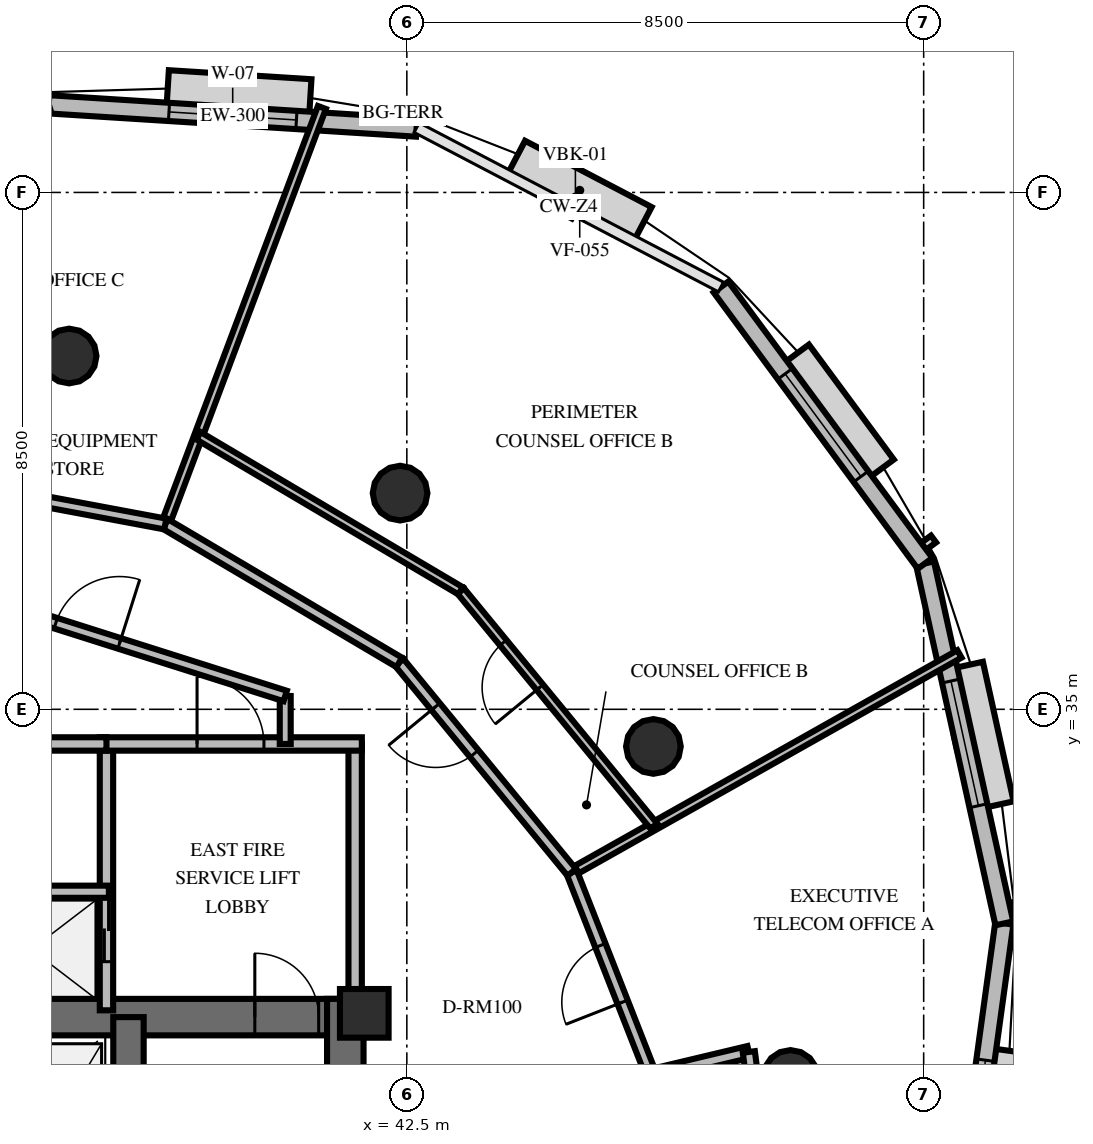
"""IFC4 building model, lengths in metres.
Left out: names, types, materials, properties, quantities, classifications, styles, units other than length and angle.
Written with IfcOpenShell. Run it as: python <this file> out.ifc"""

import sys

from ifc_helpers import new_model, si_unit, direction, frame, frame_2d, origin, origin_2d, place, context, subcontext, project, spatial, rectangle, circle, extrude, element, fill, save


model = new_model("IFC4")
c1 = context("Model", 3, precision=1e-05, world=origin(), true_north=direction((0.0, 1.0)))
c2 = subcontext(c1, "Body", "Model", "MODEL_VIEW")
j1 = project(units=[si_unit("LENGTHUNIT", "METRE"), si_unit("PLANEANGLEUNIT", "RADIAN")], contexts=[c1])
p1 = place(None, origin())
s1 = spatial("IfcSite", under=j1, at=p1, CompositionType="ELEMENT")
p2 = place(p1, origin())
s2 = spatial("IfcBuilding", under=s1, at=p2, CompositionType="ELEMENT")
p3 = place(p2, frame((0.0, 0.0, 237.6)))
s3 = spatial("IfcBuildingStorey", under=s2, at=p3, CompositionType="ELEMENT", Elevation=237.6)
p4 = place(p3, frame((26.222, 29.938, 0.0), z_axis=(0.0, 0.0, 1.0), x_axis=(1.0, 0.0, 0.0)))
e1 = element("IfcWall", 1, at=p4, inside=s3, PredefinedType="SHEAR", context=c2, shape_type="SweptSolid", body=[
    extrude(rectangle(XDim=15.566, YDim=0.6, at=frame_2d((7.783, 0.0))), origin(), (0.0, 0.0, 1.0), 3.6),
])
p5 = place(p4, frame((0.728, 0.0, 0.0)))
e2 = element("IfcOpeningElement", 2, at=p5, cuts=e1, PredefinedType="OPENING", context=c2, shape_type="SweptSolid", body=[
    extrude(rectangle(XDim=1.05, YDim=2.15, at=frame_2d((0.525, 1.075))), frame((0.0, 0.31, 0.0), z_axis=(0.0, -1.0, 0.0), x_axis=(1.0, 0.0, 0.0)), (0.0, 0.0, 1.0), 0.62),
])
p6 = place(p4, frame((13.778, 0.0, 0.0)))
e3 = element("IfcOpeningElement", 3, at=p6, cuts=e1, PredefinedType="OPENING", context=c2, shape_type="SweptSolid", body=[
    extrude(rectangle(XDim=1.05, YDim=2.15, at=frame_2d((0.525, 1.075))), frame((0.0, 0.31, 0.0), z_axis=(0.0, -1.0, 0.0), x_axis=(1.0, 0.0, 0.0)), (0.0, 0.0, 1.0), 0.62),
])
p7 = place(p4, frame((7.228, 0.0, 0.0)))
e4 = element("IfcOpeningElement", 4, at=p7, cuts=e1, PredefinedType="OPENING", context=c2, shape_type="SweptSolid", body=[
    extrude(rectangle(XDim=1.1, YDim=2.15, at=frame_2d((0.55, 1.075))), frame((0.0, 0.31, 0.0), z_axis=(0.0, -1.0, 0.0), x_axis=(1.0, 0.0, 0.0)), (0.0, 0.0, 1.0), 0.62),
])
p8 = place(p3, frame((41.488, 19.962, 0.0), z_axis=(0.0, 0.0, 1.0), x_axis=(0.0, 1.0, 0.0)))
e5 = element("IfcWall", 5, at=p8, inside=s3, PredefinedType="SHEAR", context=c2, shape_type="SweptSolid", body=[
    extrude(rectangle(XDim=10.276, YDim=0.6, at=frame_2d((5.138, 0.0))), origin(), (0.0, 0.0, 1.0), 3.6),
])
p9 = place(p3, frame((37.922, 20.262, 0.0), z_axis=(0.0, 0.0, 1.0), x_axis=(0.0, 1.0, 0.0)))
e6 = element("IfcWall", 6, at=p9, inside=s3, PredefinedType="SHEAR", context=c2, shape_type="SweptSolid", body=[
    extrude(rectangle(XDim=9.676, YDim=0.5, at=frame_2d((4.838, 0.0))), origin(), (0.0, 0.0, 1.0), 3.6),
])
p10 = place(p3, frame((41.8, 30.0, 0.0), z_axis=(0.0, 0.0, 1.0), x_axis=(1.0, 0.0, 0.0)))
e7 = element("IfcColumn", 7, at=p10, inside=s3, PredefinedType="PILASTER", context=c2, shape_type="SweptSolid", body=[
    extrude(rectangle(XDim=0.8, YDim=0.8, at=origin_2d()), origin(), (0.0, 0.0, 1.0), 3.6),
])
for number, where, z_axis, x_axis in (
    (8, (48.81, 28.946, 0.0), (0.0, 0.0, 1.0), (1.0, 0.0, 0.0)),
    (9, (46.555, 34.389, 0.0), (0.0, 0.0, 1.0), (1.0, 0.0, 0.0)),
    (10, (42.389, 38.555, 0.0), (0.0, 0.0, 1.0), (1.0, 0.0, 0.0)),
    (11, (36.946, 40.81, 0.0), (0.0, 0.0, 1.0), (1.0, 0.0, 0.0)),
):
    element("IfcColumn", number, at=place(p3, frame(where, z_axis=z_axis, x_axis=x_axis)), inside=s3, PredefinedType="COLUMN", context=c2, shape_type="SweptSolid", body=[
        extrude(circle(Radius=0.45, at=origin_2d()), origin(), (0.0, 0.0, 1.0), 3.6),
    ])
p11 = place(p3, frame((42.661, 44.567, 0.0), z_axis=(0.0, 0.0, 1.0), x_axis=(-0.998006550378, 0.063110422294, 0.0)))
e12 = element("IfcWall", 12, at=p11, inside=s3, PredefinedType="SOLIDWALL", context=c2, shape_type="SweptSolid", body=[
    extrude(rectangle(XDim=6.062, YDim=0.3, at=frame_2d((3.031, 0.0))), origin(), (0.0, 0.0, 1.0), 2.76),
])
p12 = place(p11, frame((1.981, 0.0, 0.8)))
e13 = element("IfcOpeningElement", 13, at=p12, cuts=e12, PredefinedType="OPENING", context=c2, shape_type="SweptSolid", body=[
    extrude(rectangle(XDim=2.1, YDim=1.85, at=frame_2d((1.05, 0.925))), frame((0.0, 0.16, 0.0), z_axis=(0.0, -1.0, 0.0), x_axis=(1.0, 0.0, 0.0)), (0.0, 0.0, 1.0), 0.32),
])
p13 = place(p3, frame((51.42, 24.899, 0.0), z_axis=(0.0, 0.0, 1.0), x_axis=(0.136531687657, 0.990635704114, 0.0)))
e14 = element("IfcWall", 14, at=p13, inside=s3, PredefinedType="SOLIDWALL", context=c2, shape_type="SweptSolid", body=[
    extrude(rectangle(XDim=6.643, YDim=0.3, at=frame_2d((3.322, 0.0))), origin(), (0.0, 0.0, 1.0), 2.76),
])
p14 = place(p13, frame((2.272, 0.0, 0.8)))
e15 = element("IfcOpeningElement", 15, at=p14, cuts=e14, PredefinedType="OPENING", context=c2, shape_type="SweptSolid", body=[
    extrude(rectangle(XDim=2.1, YDim=1.85, at=frame_2d((1.05, 0.925))), frame((0.0, 0.16, 0.0), z_axis=(0.0, -1.0, 0.0), x_axis=(1.0, 0.0, 0.0)), (0.0, 0.0, 1.0), 0.32),
])
p15 = place(p3, frame((52.327, 31.479, 0.0), z_axis=(0.0, 0.0, 1.0), x_axis=(-0.215062302222, 0.976600330823, 0.0)))
e16 = element("IfcWall", 16, at=p15, inside=s3, PredefinedType="SOLIDWALL", context=c2, shape_type="SweptSolid", body=[
    extrude(rectangle(XDim=6.062, YDim=0.3, at=frame_2d((3.031, 0.0))), origin(), (0.0, 0.0, 1.0), 2.76),
])
p16 = place(p15, frame((1.981, 0.0, 0.8)))
e17 = element("IfcOpeningElement", 17, at=p16, cuts=e16, PredefinedType="OPENING", context=c2, shape_type="SweptSolid", body=[
    extrude(rectangle(XDim=2.1, YDim=1.85, at=frame_2d((1.05, 0.925))), frame((0.0, 0.16, 0.0), z_axis=(0.0, -1.0, 0.0), x_axis=(1.0, 0.0, 0.0)), (0.0, 0.0, 1.0), 0.32),
])
p17 = place(p3, frame((51.023, 37.4, 0.0), z_axis=(0.0, 0.0, 1.0), x_axis=(-0.594093357813, 0.804396097829, 0.0)))
e18 = element("IfcWall", 18, at=p17, inside=s3, PredefinedType="SOLIDWALL", context=c2, shape_type="SweptSolid", body=[
    extrude(rectangle(XDim=5.65, YDim=0.3, at=frame_2d((2.825, 0.0))), origin(), (0.0, 0.0, 1.0), 2.76),
])
p18 = place(p17, frame((1.775, 0.0, 0.8)))
e19 = element("IfcOpeningElement", 19, at=p18, cuts=e18, PredefinedType="OPENING", context=c2, shape_type="SweptSolid", body=[
    extrude(rectangle(XDim=2.1, YDim=1.85, at=frame_2d((1.05, 0.925))), frame((0.0, 0.16, 0.0), z_axis=(0.0, -1.0, 0.0), x_axis=(1.0, 0.0, 0.0)), (0.0, 0.0, 1.0), 0.32),
])
p19 = place(p3, frame((37.56, 30.05, 0.0), z_axis=(0.0, 0.0, 1.0), x_axis=(0.0, 1.0, 0.0)))
e20 = element("IfcWall", 20, at=p19, inside=s3, PredefinedType="SOLIDWALL", context=c2, shape_type="SweptSolid", body=[
    extrude(rectangle(XDim=4.38, YDim=0.22, at=frame_2d((2.19, 0.0))), origin(), (0.0, 0.0, 1.0), 2.46),
])
p20 = place(p19, frame((0.8, 0.0, 0.0)))
e21 = element("IfcOpeningElement", 21, at=p20, cuts=e20, PredefinedType="OPENING", context=c2, shape_type="SweptSolid", body=[
    extrude(rectangle(XDim=1.05, YDim=2.1, at=frame_2d((0.525, 1.05))), frame((0.0, 0.12, 0.0), z_axis=(0.0, -1.0, 0.0), x_axis=(1.0, 0.0, 0.0)), (0.0, 0.0, 1.0), 0.24),
])
p21 = place(p3, frame((41.65, 30.05, 0.0), z_axis=(0.0, 0.0, 1.0), x_axis=(0.0, 1.0, 0.0)))
e22 = element("IfcWall", 22, at=p21, inside=s3, PredefinedType="SOLIDWALL", context=c2, shape_type="SweptSolid", body=[
    extrude(rectangle(XDim=4.38, YDim=0.22, at=frame_2d((2.19, 0.0))), origin(), (0.0, 0.0, 1.0), 2.46),
])
p22 = place(p3, frame((37.45, 34.43, 0.0), z_axis=(0.0, 0.0, 1.0), x_axis=(1.0, 0.0, 0.0)))
e23 = element("IfcWall", 23, at=p22, inside=s3, PredefinedType="SOLIDWALL", context=c2, shape_type="SweptSolid", body=[
    extrude(rectangle(XDim=4.31, YDim=0.22, at=frame_2d((2.155, 0.0))), origin(), (0.0, 0.0, 1.0), 2.46),
])
p23 = place(p22, frame((1.6, 0.0, 0.0)))
e24 = element("IfcOpeningElement", 24, at=p23, cuts=e23, PredefinedType="OPENING", context=c2, shape_type="SweptSolid", body=[
    extrude(rectangle(XDim=1.1, YDim=2.15, at=frame_2d((0.55, 1.075))), frame((0.0, 0.12, 0.0), z_axis=(0.0, -1.0, 0.0), x_axis=(1.0, 0.0, 0.0)), (0.0, 0.0, 1.0), 0.24),
])
p24 = place(p3, frame((35.05, 32.0, 0.0), z_axis=(0.0, 0.0, 1.0), x_axis=(1.0, 0.0, 0.0)))
e25 = element("IfcWall", 25, at=p24, inside=s3, PredefinedType="SOLIDWALL", context=c2, shape_type="SweptSolid", body=[
    extrude(rectangle(XDim=2.55, YDim=0.2, at=frame_2d((1.275, 0.0))), origin(), (0.0, 0.0, 1.0), 2.46),
])
p25 = place(p3, frame((30.44, 34.43, 0.0), z_axis=(0.0, 0.0, 1.0), x_axis=(1.0, 0.0, 0.0)))
e26 = element("IfcWall", 26, at=p25, inside=s3, PredefinedType="SOLIDWALL", context=c2, shape_type="SweptSolid", body=[
    extrude(rectangle(XDim=7.12, YDim=0.22, at=frame_2d((3.56, 0.0))), origin(), (0.0, 0.0, 1.0), 2.46),
])
p26 = place(p25, frame((3.01, 0.0, 0.0)))
e27 = element("IfcOpeningElement", 27, at=p26, cuts=e26, PredefinedType="OPENING", context=c2, shape_type="SweptSolid", body=[
    extrude(rectangle(XDim=1.1, YDim=2.15, at=frame_2d((0.55, 1.075))), frame((0.0, 0.12, 0.0), z_axis=(0.0, -1.0, 0.0), x_axis=(1.0, 0.0, 0.0)), (0.0, 0.0, 1.0), 0.24),
])
p27 = place(p3, frame((40.5, 35.219, 0.0), z_axis=(0.0, 0.0, 1.0), x_axis=(0.0, -1.0, 0.0)))
e28 = element("IfcWall", 28, at=p27, inside=s3, PredefinedType="PARTITIONING", context=c2, shape_type="SweptSolid", body=[
    extrude(rectangle(XDim=0.789, YDim=0.18, at=frame_2d((0.395, 0.0))), origin(), (0.0, 0.0, 1.0), 2.46),
])
p28 = place(p3, frame((34.0, 37.28, 0.0), z_axis=(0.0, 0.0, 1.0), x_axis=(0.953228121756, -0.302251795518, 0.0)))
e29 = element("IfcWall", 29, at=p28, inside=s3, PredefinedType="PARTITIONING", context=c2, shape_type="SweptSolid", body=[
    extrude(rectangle(XDim=6.819, YDim=0.18, at=frame_2d((3.409, 0.0))), origin(), (0.0, 0.0, 1.0), 2.46),
])
p29 = place(p28, frame((2.86, 0.0, 0.0)))
e30 = element("IfcOpeningElement", 30, at=p29, cuts=e29, PredefinedType="OPENING", context=c2, shape_type="SweptSolid", body=[
    extrude(rectangle(XDim=1.1, YDim=2.15, at=frame_2d((0.55, 1.075))), frame((0.0, 0.1, 0.0), z_axis=(0.0, -1.0, 0.0), x_axis=(1.0, 0.0, 0.0)), (0.0, 0.0, 1.0), 0.2),
])
p30 = place(p3, frame((46.52, 28.983, 0.0), z_axis=(0.0, 0.0, 1.0), x_axis=(0.972788749697, 0.231693867989, 0.0)))
e31 = element("IfcWall", 31, at=p30, inside=s3, PredefinedType="PLUMBINGWALL", context=c2, shape_type="SweptSolid", body=[
    extrude(rectangle(XDim=1.65, YDim=0.2, at=frame_2d((0.825, 0.0))), origin(), (0.0, 0.0, 1.0), 2.46),
])
p31 = place(p3, frame((48.516, 26.355, 0.0), z_axis=(0.0, 0.0, 1.0), x_axis=(-0.128764955516, 0.991675141481, 0.0)))
e32 = element("IfcWall", 32, at=p31, inside=s3, PredefinedType="PLUMBINGWALL", context=c2, shape_type="SweptSolid", body=[
    extrude(rectangle(XDim=3.036, YDim=0.2, at=frame_2d((1.518, 0.0))), origin(), (0.0, 0.0, 1.0), 2.46),
])
p32 = place(p3, frame((45.212, 32.318, 0.0), z_axis=(0.0, 0.0, 1.0), x_axis=(0.871214471027, 0.490902582468, 0.0)))
e33 = element("IfcWall", 33, at=p32, inside=s3, PredefinedType="PARTITIONING", context=c2, shape_type="SweptSolid", body=[
    extrude(rectangle(XDim=7.318, YDim=0.14, at=frame_2d((3.659, 0.0))), origin(), (0.0, 0.0, 1.0), 2.46),
])
p33 = place(p3, frame((46.52, 28.983, 0.0), z_axis=(0.0, 0.0, 1.0), x_axis=(-0.364895255198, 0.931048577, 0.0)))
e34 = element("IfcWall", 34, at=p33, inside=s3, PredefinedType="PARTITIONING", context=c2, shape_type="SweptSolid", body=[
    extrude(rectangle(XDim=3.582, YDim=0.18, at=frame_2d((1.791, 0.0))), origin(), (0.0, 0.0, 1.0), 2.46),
])
p34 = place(p33, frame((1.291, 0.0, 0.0)))
e35 = element("IfcOpeningElement", 35, at=p34, cuts=e34, PredefinedType="OPENING", context=c2, shape_type="SweptSolid", body=[
    extrude(rectangle(XDim=1.0, YDim=2.15, at=frame_2d((0.5, 1.075))), frame((0.0, 0.1, 0.0), z_axis=(0.0, -1.0, 0.0), x_axis=(1.0, 0.0, 0.0)), (0.0, 0.0, 1.0), 0.2),
])
p35 = place(p3, frame((38.528, 38.047, 0.0), z_axis=(0.0, 0.0, 1.0), x_axis=(0.351821633052, 0.936067058771, 0.0)))
e36 = element("IfcWall", 36, at=p35, inside=s3, PredefinedType="PARTITIONING", context=c2, shape_type="SweptSolid", body=[
    extrude(rectangle(XDim=7.318, YDim=0.14, at=frame_2d((3.659, 0.0))), origin(), (0.0, 0.0, 1.0), 2.46),
])
p36 = place(p3, frame((45.212, 32.318, 0.0), z_axis=(0.0, 0.0, 1.0), x_axis=(-0.634714961422, 0.772746347611, 0.0)))
e37 = element("IfcWall", 37, at=p36, inside=s3, PredefinedType="PARTITIONING", context=c2, shape_type="SweptSolid", body=[
    extrude(rectangle(XDim=4.469, YDim=0.18, at=frame_2d((2.235, 0.0))), origin(), (0.0, 0.0, 1.0), 2.46),
])
p37 = place(p36, frame((2.527, 0.0, 0.0)))
e38 = element("IfcOpeningElement", 38, at=p37, cuts=e37, PredefinedType="OPENING", context=c2, shape_type="SweptSolid", body=[
    extrude(rectangle(XDim=1.0, YDim=2.15, at=frame_2d((0.5, 1.075))), frame((0.0, 0.1, 0.0), z_axis=(0.0, -1.0, 0.0), x_axis=(1.0, 0.0, 0.0)), (0.0, 0.0, 1.0), 0.2),
])
p38 = place(p3, frame((42.375, 35.772, 0.0), z_axis=(0.0, 0.0, 1.0), x_axis=(-0.860724202021, 0.509071554946, 0.0)))
e39 = element("IfcWall", 39, at=p38, inside=s3, PredefinedType="PARTITIONING", context=c2, shape_type="SweptSolid", body=[
    extrude(rectangle(XDim=4.47, YDim=0.18, at=frame_2d((2.235, 0.0))), origin(), (0.0, 0.0, 1.0), 2.46),
])
p39 = place(p3, frame((46.563, 33.079, 0.0), z_axis=(0.0, 0.0, 1.0), x_axis=(-0.634725908392, 0.772737355908, 0.0)))
e40 = element("IfcWall", 40, at=p39, inside=s3, PredefinedType="PARTITIONING", context=c2, shape_type="SweptSolid", body=[
    extrude(rectangle(XDim=5.008, YDim=0.14, at=frame_2d((2.504, 0.0))), origin(), (0.0, 0.0, 1.0), 2.46),
])
p40 = place(p39, frame((2.954, 0.0, 0.0)))
e41 = element("IfcOpeningElement", 41, at=p40, cuts=e40, PredefinedType="OPENING", context=c2, shape_type="SweptSolid", body=[
    extrude(rectangle(XDim=0.95, YDim=2.15, at=frame_2d((0.475, 1.075))), frame((0.0, 0.08, 0.0), z_axis=(0.0, -1.0, 0.0), x_axis=(1.0, 0.0, 0.0)), (0.0, 0.0, 1.0), 0.16),
])
p41 = place(p3, frame((43.384, 36.949, 0.0), z_axis=(0.0, 0.0, 1.0), x_axis=(-0.860748876633, 0.509029833483, 0.0)))
e42 = element("IfcWall", 42, at=p41, inside=s3, PredefinedType="PARTITIONING", context=c2, shape_type="SweptSolid", body=[
    extrude(rectangle(XDim=5.008, YDim=0.14, at=frame_2d((2.504, 0.0))), origin(), (0.0, 0.0, 1.0), 2.46),
])
p42 = place(p3, frame((38.528, 38.047, 0.0), z_axis=(0.0, 0.0, 1.0), x_axis=(-0.982933965097, 0.183958746079, 0.0)))
e43 = element("IfcWall", 43, at=p42, inside=s3, PredefinedType="PARTITIONING", context=c2, shape_type="SweptSolid", body=[
    extrude(rectangle(XDim=4.47, YDim=0.18, at=frame_2d((2.235, 0.0))), origin(), (0.0, 0.0, 1.0), 2.46),
])
p43 = place(p12, origin())
e44 = element("IfcWindow", 44, at=p43, inside=s3, PartitioningType="SINGLE_PANEL", PredefinedType="WINDOW", context=c2, shape_type="SweptSolid", body=[
    extrude(rectangle(XDim=2.1, YDim=1.85, at=frame_2d((1.05, 0.925))), frame((0.0, 0.03, 0.0), z_axis=(0.0, -1.0, 0.0), x_axis=(1.0, 0.0, 0.0)), (0.0, 0.0, 1.0), 0.06),
])
fill(e13, e44)
p44 = place(p14, origin())
e45 = element("IfcWindow", 45, at=p44, inside=s3, PartitioningType="SINGLE_PANEL", PredefinedType="WINDOW", context=c2, shape_type="SweptSolid", body=[
    extrude(rectangle(XDim=2.1, YDim=1.85, at=frame_2d((1.05, 0.925))), frame((0.0, 0.03, 0.0), z_axis=(0.0, -1.0, 0.0), x_axis=(1.0, 0.0, 0.0)), (0.0, 0.0, 1.0), 0.06),
])
fill(e15, e45)
p45 = place(p16, origin())
e46 = element("IfcWindow", 46, at=p45, inside=s3, PartitioningType="SINGLE_PANEL", PredefinedType="WINDOW", context=c2, shape_type="SweptSolid", body=[
    extrude(rectangle(XDim=2.1, YDim=1.85, at=frame_2d((1.05, 0.925))), frame((0.0, 0.03, 0.0), z_axis=(0.0, -1.0, 0.0), x_axis=(1.0, 0.0, 0.0)), (0.0, 0.0, 1.0), 0.06),
])
fill(e17, e46)
p46 = place(p18, origin())
e47 = element("IfcWindow", 47, at=p46, inside=s3, PartitioningType="SINGLE_PANEL", PredefinedType="WINDOW", context=c2, shape_type="SweptSolid", body=[
    extrude(rectangle(XDim=2.1, YDim=1.85, at=frame_2d((1.05, 0.925))), frame((0.0, 0.03, 0.0), z_axis=(0.0, -1.0, 0.0), x_axis=(1.0, 0.0, 0.0)), (0.0, 0.0, 1.0), 0.06),
])
fill(e19, e47)
p47 = place(p6, origin())
e48 = element("IfcDoor", 48, at=p47, inside=s3, OperationType="SINGLE_SWING_LEFT", PredefinedType="DOOR", context=c2, shape_type="SweptSolid", body=[
    extrude(rectangle(XDim=1.05, YDim=2.15, at=frame_2d((0.525, 1.075))), frame((0.0, 0.025, 0.0), z_axis=(0.0, -1.0, 0.0), x_axis=(1.0, 0.0, 0.0)), (0.0, 0.0, 1.0), 0.05),
])
fill(e3, e48)
p48 = place(p23, origin())
e49 = element("IfcDoor", 49, at=p48, inside=s3, OperationType="SINGLE_SWING_LEFT", PredefinedType="DOOR", context=c2, shape_type="SweptSolid", body=[
    extrude(rectangle(XDim=1.1, YDim=2.15, at=frame_2d((0.55, 1.075))), frame((0.0, 0.025, 0.0), z_axis=(0.0, -1.0, 0.0), x_axis=(1.0, 0.0, 0.0)), (0.0, 0.0, 1.0), 0.05),
])
fill(e24, e49)
p49 = place(p20, origin())
e50 = element("IfcDoor", 50, at=p49, inside=s3, OperationType="DOUBLE_DOOR_SLIDING", PredefinedType="USERDEFINED", context=c2, shape_type="SweptSolid", body=[
    extrude(rectangle(XDim=1.05, YDim=2.1, at=frame_2d((0.525, 1.05))), frame((0.0, 0.025, 0.0), z_axis=(0.0, -1.0, 0.0), x_axis=(1.0, 0.0, 0.0)), (0.0, 0.0, 1.0), 0.05),
])
fill(e21, e50)
p50 = place(p29, origin())
e51 = element("IfcDoor", 51, at=p50, inside=s3, OperationType="SINGLE_SWING_RIGHT", PredefinedType="DOOR", context=c2, shape_type="SweptSolid", body=[
    extrude(rectangle(XDim=1.1, YDim=2.15, at=frame_2d((0.55, 1.075))), frame((0.0, 0.025, 0.0), z_axis=(0.0, -1.0, 0.0), x_axis=(1.0, 0.0, 0.0)), (0.0, 0.0, 1.0), 0.05),
])
fill(e30, e51)
p51 = place(p34, origin())
e52 = element("IfcDoor", 52, at=p51, inside=s3, OperationType="SINGLE_SWING_LEFT", PredefinedType="DOOR", context=c2, shape_type="SweptSolid", body=[
    extrude(rectangle(XDim=1.0, YDim=2.15, at=frame_2d((0.5, 1.075))), frame((0.0, 0.025, 0.0), z_axis=(0.0, -1.0, 0.0), x_axis=(1.0, 0.0, 0.0)), (0.0, 0.0, 1.0), 0.05),
])
fill(e35, e52)
p52 = place(p37, origin())
e53 = element("IfcDoor", 53, at=p52, inside=s3, OperationType="SINGLE_SWING_RIGHT", PredefinedType="DOOR", context=c2, shape_type="SweptSolid", body=[
    extrude(rectangle(XDim=1.0, YDim=2.15, at=frame_2d((0.5, 1.075))), frame((0.0, 0.025, 0.0), z_axis=(0.0, -1.0, 0.0), x_axis=(1.0, 0.0, 0.0)), (0.0, 0.0, 1.0), 0.05),
])
fill(e38, e53)
p53 = place(p40, origin())
e54 = element("IfcDoor", 54, at=p53, inside=s3, OperationType="SINGLE_SWING_LEFT", PredefinedType="DOOR", context=c2, shape_type="SweptSolid", body=[
    extrude(rectangle(XDim=0.95, YDim=2.15, at=frame_2d((0.475, 1.075))), frame((0.0, 0.025, 0.0), z_axis=(0.0, -1.0, 0.0), x_axis=(1.0, 0.0, 0.0)), (0.0, 0.0, 1.0), 0.05),
])
fill(e41, e54)
save(model, sys.argv[1])
